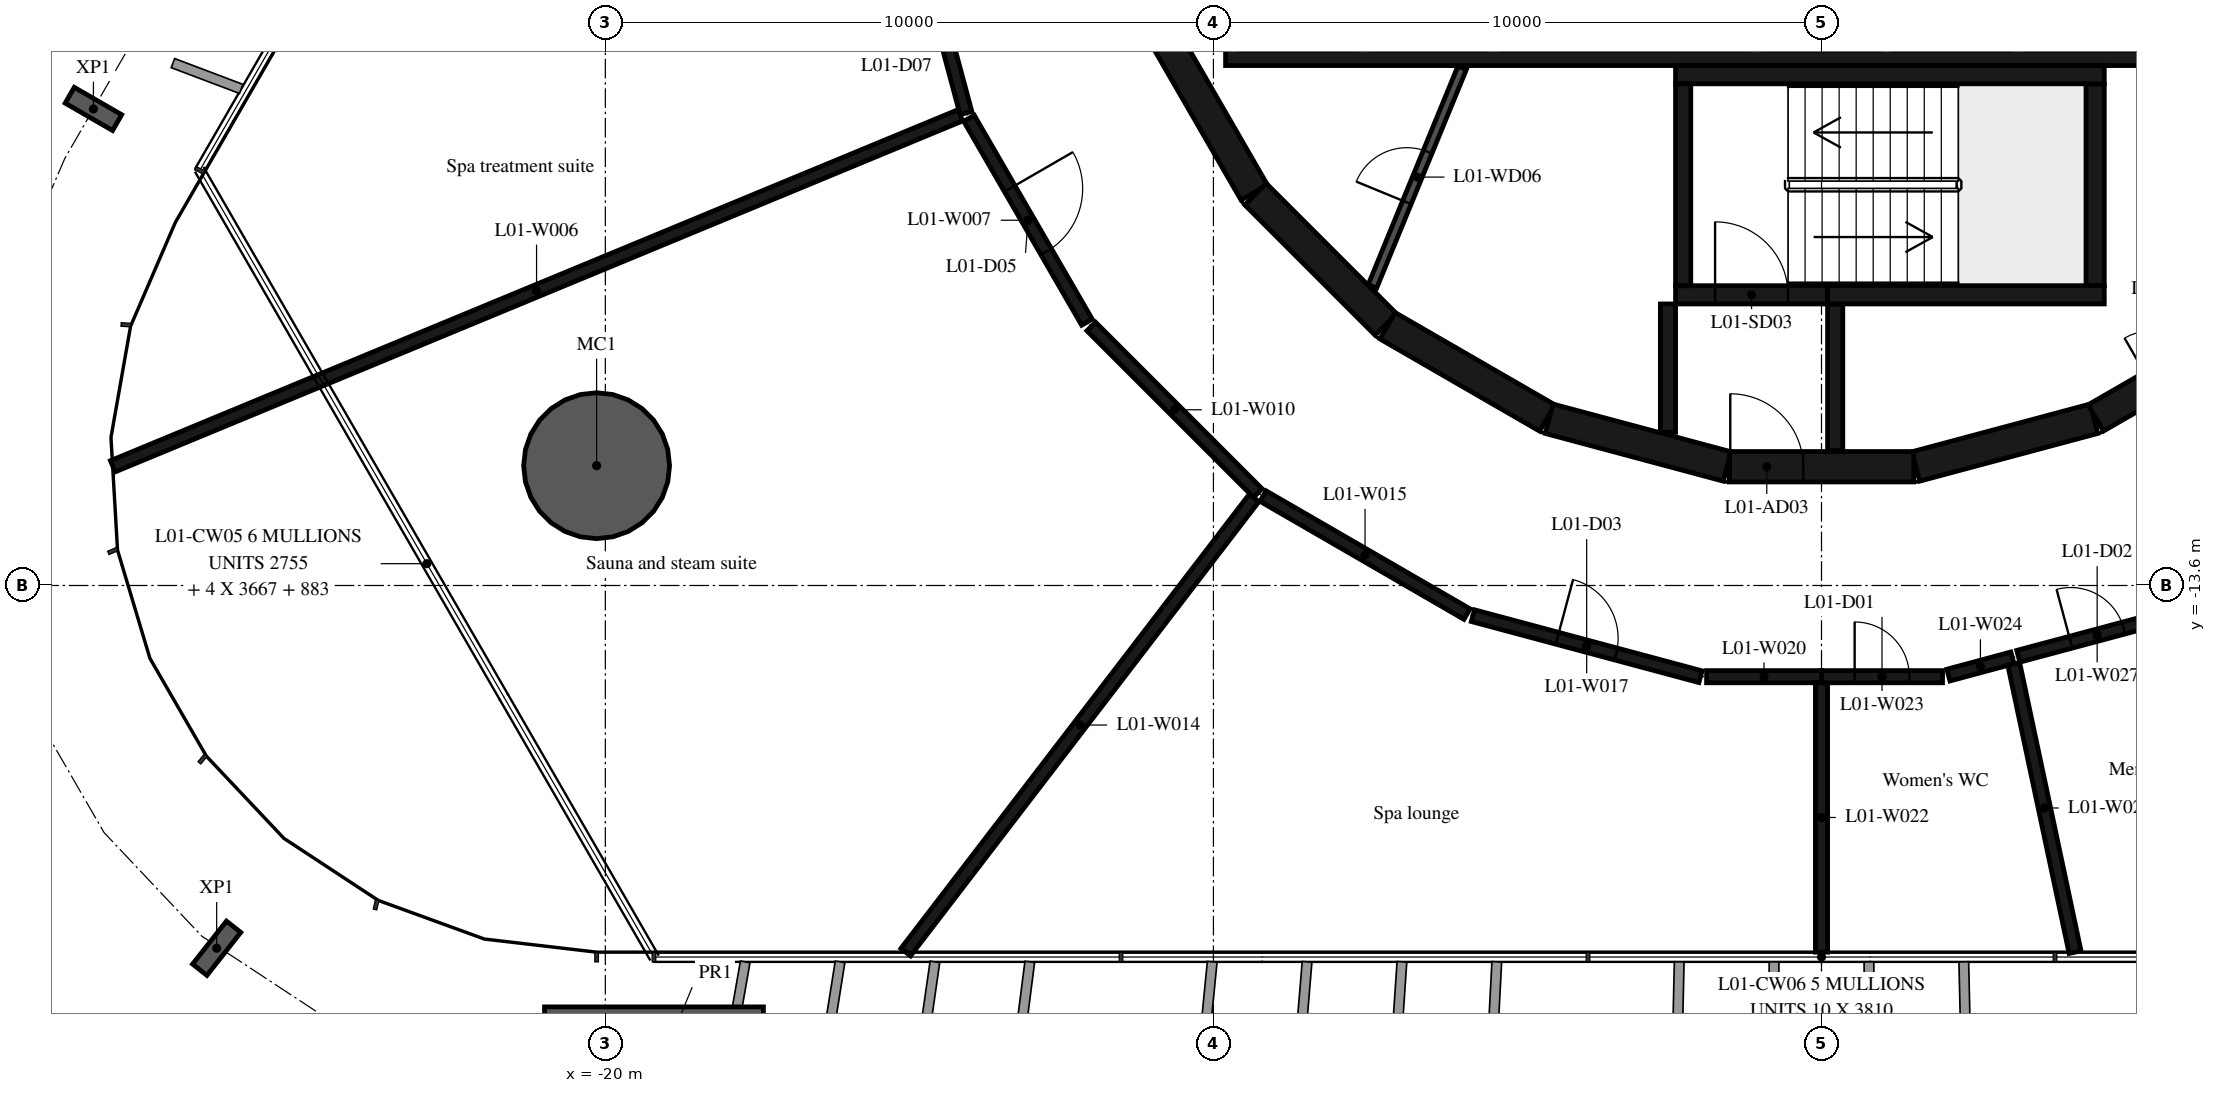
"""IFC4 building model, lengths in metres.
Left out: names, types, materials, properties, quantities, classifications, styles, units other than length and angle.
Written with IfcOpenShell. Run it as: python <this file> out.ifc"""

import sys

from ifc_helpers import new_model, si_unit, direction, frame, frame_2d, origin, origin_2d, place, context, subcontext, project, spatial, polyline, rectangle, hollow_circle, i_section, outline, extrude, element, fill, save


model = new_model("IFC4")
c1 = context("Model", 3, precision=1e-05, world=origin(), true_north=direction((0.0, 1.0)))
c2 = subcontext(c1, "Body", "Model", "MODEL_VIEW")
j1 = project(units=[si_unit("LENGTHUNIT", "METRE"), si_unit("PLANEANGLEUNIT", "RADIAN")], contexts=[c1])
p1 = place(None, origin())
s1 = spatial("IfcSite", under=j1, at=p1, CompositionType="ELEMENT")
p2 = place(p1, origin())
s2 = spatial("IfcBuilding", under=s1, at=p2, CompositionType="ELEMENT")
p3 = place(p2, frame((0.0, 0.0, 9.0)))
s3 = spatial("IfcBuildingStorey", under=s2, at=p3, CompositionType="ELEMENT", Elevation=9.0)
p4 = place(p3, frame((-20.144, -11.63, -0.38), z_axis=(0.0, 0.0, 1.0), x_axis=(1.0, 0.0, 0.0)))
e1 = element("IfcColumn", 1, at=p4, inside=s3, PredefinedType="COLUMN", context=c2, shape_type="SweptSolid", body=[
    extrude(hollow_circle(Radius=1.2, WallThickness=0.06, at=origin_2d()), origin(), (0.0, 0.0, 1.0), 4.8),
])
for number, where, z_axis, x_axis in (
    (2, (-28.419, -5.763, -0.38), (0.0, 0.0, 1.0), (0.5, 0.866, 0.0)),
    (3, (-26.392, -19.565, -0.38), (0.0, 0.0, 1.0), (-0.786, 0.619, 0.0)),
):
    element("IfcColumn", number, at=place(p3, frame(where, z_axis=z_axis, x_axis=x_axis)), inside=s3, PredefinedType="COLUMN", context=c2, shape_type="SweptSolid", body=[
        extrude(i_section(OverallWidth=0.3, OverallDepth=0.9, WebThickness=0.019, FlangeThickness=0.035, FilletRadius=0.03, at=origin_2d()), origin(), (0.0, 0.0, 1.0), 4.8),
    ])
p5 = place(p3, frame((-19.2, -21.73, -0.38), z_axis=(0.0, 0.0, 1.0), x_axis=(1.0, 0.0, 0.0)))
e4 = element("IfcColumn", 4, at=p5, inside=s3, PredefinedType="COLUMN", context=c2, shape_type="SweptSolid", body=[
    extrude(rectangle(XDim=3.6, YDim=2.4, at=origin_2d()), origin(), (0.0, 0.0, 1.0), 4.8),
])
p6 = place(p3, frame((1.55, -11.643, 0.0), z_axis=(0.0, 0.0, 1.0), x_axis=(0.965948410781, 0.258734743916, 0.0)))
e5 = element("IfcWall", 5, at=p6, inside=s3, PredefinedType="SHEAR", context=c2, shape_type="SweptSolid", body=[
    extrude(rectangle(XDim=3.033, YDim=0.5, at=frame_2d((1.516, 0.0))), origin(), (0.0, 0.0, 1.0), 4.42),
])
p7 = place(p3, frame((4.51, -10.845, 0.0), z_axis=(0.0, 0.0, 1.0), x_axis=(0.865975092491, 0.500087131594, 0.0)))
e6 = element("IfcWall", 6, at=p7, inside=s3, PredefinedType="SHEAR", context=c2, shape_type="SweptSolid", body=[
    extrude(rectangle(XDim=3.033, YDim=0.5, at=frame_2d((1.516, 0.0))), origin(), (0.0, 0.0, 1.0), 4.42),
])
p8 = place(p7, frame((1.066, 0.0, 0.0)))
e7 = element("IfcOpeningElement", 7, at=p8, cuts=e6, PredefinedType="OPENING", context=c2, shape_type="SweptSolid", body=[
    extrude(rectangle(XDim=0.9, YDim=2.1, at=frame_2d((0.45, 1.05))), frame((0.0, 0.26, 0.0), z_axis=(0.0, -1.0, 0.0), x_axis=(1.0, 0.0, 0.0)), (0.0, 0.0, 1.0), 0.52),
])
p9 = place(p3, frame((-10.845, -4.51, 0.0), z_axis=(0.0, 0.0, 1.0), x_axis=(0.500087131594, -0.865975092491, 0.0)))
e8 = element("IfcWall", 8, at=p9, inside=s3, PredefinedType="SHEAR", context=c2, shape_type="SweptSolid", body=[
    extrude(rectangle(XDim=3.033, YDim=0.5, at=frame_2d((1.516, 0.0))), origin(), (0.0, 0.0, 1.0), 4.42),
])
p10 = place(p3, frame((-9.308, -7.164, 0.0), z_axis=(0.0, 0.0, 1.0), x_axis=(0.707106781187, -0.707106781187, 0.0)))
e9 = element("IfcWall", 9, at=p10, inside=s3, PredefinedType="SHEAR", context=c2, shape_type="SweptSolid", body=[
    extrude(rectangle(XDim=3.032, YDim=0.5, at=frame_2d((1.516, 0.0))), origin(), (0.0, 0.0, 1.0), 4.42),
])
for number, where, z_axis, x_axis in (
    (10, (-7.137, -9.329, 0.0), (0.0, 0.0, 1.0), (0.866, -0.5, 0.0)),
    (11, (-4.479, -10.858, 0.0), (0.0, 0.0, 1.0), (0.966, -0.259, 0.0)),
):
    element("IfcWall", number, at=place(p3, frame(where, z_axis=z_axis, x_axis=x_axis)), inside=s3, PredefinedType="SHEAR", context=c2, shape_type="SweptSolid", body=[
        extrude(rectangle(XDim=3.033, YDim=0.5, at=frame_2d((1.516, 0.0))), origin(), (0.0, 0.0, 1.0), 4.42),
    ])
p11 = place(p3, frame((-1.516, -11.647, 0.0), z_axis=(0.0, 0.0, 1.0), x_axis=(1.0, 0.0, 0.0)))
e12 = element("IfcWall", 12, at=p11, inside=s3, PredefinedType="SHEAR", context=c2, shape_type="SweptSolid", body=[
    extrude(rectangle(XDim=3.033, YDim=0.5, at=frame_2d((1.516, 0.0))), origin(), (0.0, 0.0, 1.0), 4.42),
])
p12 = place(p11, frame((0.016, 0.0, 0.0)))
e13 = element("IfcOpeningElement", 13, at=p12, cuts=e12, PredefinedType="OPENING", context=c2, shape_type="SweptSolid", body=[
    extrude(rectangle(XDim=1.2, YDim=2.1, at=frame_2d((0.6, 1.05))), frame((0.0, 0.26, 0.0), z_axis=(0.0, -1.0, 0.0), x_axis=(1.0, 0.0, 0.0)), (0.0, 0.0, 1.0), 0.52),
])
p13 = place(p3, frame((-2.275, -8.67, 0.0), z_axis=(0.0, 0.0, 1.0), x_axis=(0.0, 1.0, 0.0)))
e14 = element("IfcWall", 14, at=p13, inside=s3, PredefinedType="SHEAR", context=c2, shape_type="SweptSolid", body=[
    extrude(rectangle(XDim=3.32, YDim=0.25, at=frame_2d((1.66, 0.0))), origin(), (0.0, 0.0, 1.0), 4.42),
])
p14 = place(p3, frame((-2.4, -5.2, 0.0), z_axis=(0.0, 0.0, 1.0), x_axis=(1.0, 0.0, 0.0)))
e15 = element("IfcWall", 15, at=p14, inside=s3, PredefinedType="SHEAR", context=c2, shape_type="SweptSolid", body=[
    extrude(rectangle(XDim=7.05, YDim=0.3, at=frame_2d((3.525, 0.0))), origin(), (0.0, 0.0, 1.0), 4.42),
])
p15 = place(p3, frame((4.5, -8.67, 0.0), z_axis=(0.0, 0.0, 1.0), x_axis=(0.0, 1.0, 0.0)))
e16 = element("IfcWall", 16, at=p15, inside=s3, PredefinedType="SHEAR", context=c2, shape_type="SweptSolid", body=[
    extrude(rectangle(XDim=3.32, YDim=0.3, at=frame_2d((1.66, 0.0))), origin(), (0.0, 0.0, 1.0), 4.42),
])
p16 = place(p3, frame((0.1, -8.82, 0.0), z_axis=(0.0, 0.0, 1.0), x_axis=(1.0, 0.0, 0.0)))
e17 = element("IfcWall", 17, at=p16, inside=s3, PredefinedType="SHEAR", context=c2, shape_type="SweptSolid", body=[
    extrude(rectangle(XDim=4.55, YDim=0.3, at=frame_2d((2.275, 0.0))), origin(), (0.0, 0.0, 1.0), 4.42),
])
p17 = place(p3, frame((-2.4, -8.82, 0.0), z_axis=(0.0, 0.0, 1.0), x_axis=(1.0, 0.0, 0.0)))
e18 = element("IfcWall", 18, at=p17, inside=s3, PredefinedType="SHEAR", context=c2, shape_type="SweptSolid", body=[
    extrude(rectangle(XDim=2.5, YDim=0.3, at=frame_2d((1.25, 0.0))), origin(), (0.0, 0.0, 1.0), 4.42),
])
p18 = place(p17, frame((0.65, 0.0, 0.0)))
e19 = element("IfcOpeningElement", 19, at=p18, cuts=e18, PredefinedType="OPENING", context=c2, shape_type="SweptSolid", body=[
    extrude(rectangle(XDim=1.2, YDim=2.1, at=frame_2d((0.6, 1.05))), frame((0.0, 0.16, 0.0), z_axis=(0.0, -1.0, 0.0), x_axis=(1.0, 0.0, 0.0)), (0.0, 0.0, 1.0), 0.32),
])
p19 = place(p3, frame((-2.525, -8.97, 0.0), z_axis=(0.0, 0.0, 1.0), x_axis=(0.0, -1.0, 0.0)))
e20 = element("IfcWall", 20, at=p19, inside=s3, PredefinedType="SHEAR", context=c2, shape_type="SweptSolid", body=[
    extrude(rectangle(XDim=2.11, YDim=0.25, at=frame_2d((1.055, 0.0))), origin(), (0.0, 0.0, 1.0), 4.42),
])
p20 = place(p3, frame((0.225, -8.97, 0.0), z_axis=(0.0, 0.0, 1.0), x_axis=(0.0, -1.0, 0.0)))
e21 = element("IfcWall", 21, at=p20, inside=s3, PredefinedType="SHEAR", context=c2, shape_type="SweptSolid", body=[
    extrude(rectangle(XDim=2.41, YDim=0.25, at=frame_2d((1.205, 0.0))), origin(), (0.0, 0.0, 1.0), 4.42),
])
p21 = place(p3, origin())
e22 = element("IfcWall", 22, at=p21, inside=s3, PredefinedType="SHEAR", context=c2, shape_type="SweptSolid", body=[
    extrude(outline(polyline([(9.8, -5.05), (9.8, -4.8), (9.8, -1.9), (9.55, -1.9), (9.55, -4.8), (7.65, -4.8), (7.65, -1.9), (7.4, -1.9), (7.4, -4.8), (5.5, -4.8), (5.5, -1.9), (5.25, -1.9), (5.25, -4.8), (3.35, -4.8), (3.35, -1.9), (3.1, -1.9), (3.1, -4.8), (1.2, -4.8), (1.2, -1.9), (0.95, -1.9), (0.95, -4.8), (-0.95, -4.8), (-0.95, -1.9), (-1.2, -1.9), (-1.2, -4.8), (-5.25, -4.8), (-5.25, -1.9), (-5.5, -1.9), (-5.5, -4.8), (-7.4, -4.8), (-7.4, -1.9), (-7.65, -1.9), (-7.65, -4.8), (-9.55, -4.8), (-9.55, -1.9), (-9.8, -1.9), (-9.8, -4.8), (-9.8, -5.05), (9.8, -5.05)])), origin(), (0.0, 0.0, 1.0), 4.42),
])
p22 = place(p3, frame((-7.385, -8.681, 0.0), z_axis=(0.0, 0.0, 1.0), x_axis=(0.379804590409, 0.925066739811, 0.0)))
e23 = element("IfcWall", 23, at=p22, inside=s3, PredefinedType="PARTITIONING", context=c2, shape_type="SweptSolid", body=[
    extrude(rectangle(XDim=3.885, YDim=0.15, at=frame_2d((1.942, 0.0))), origin(), (0.0, 0.0, 1.0), 4.42),
])
p23 = place(p22, frame((1.493, 0.0, 0.0)))
e24 = element("IfcOpeningElement", 24, at=p23, cuts=e23, PredefinedType="OPENING", context=c2, shape_type="SweptSolid", body=[
    extrude(rectangle(XDim=0.9, YDim=2.1, at=frame_2d((0.45, 1.05))), frame((0.0, 0.085, 0.0), z_axis=(0.0, -1.0, 0.0), x_axis=(1.0, 0.0, 0.0)), (0.0, 0.0, 1.0), 0.17),
])
p24 = place(p3, frame((-15.068, -2.111, 0.0), z_axis=(0.0, 0.0, 1.0), x_axis=(0.259059323171, -0.965861411942, 0.0)))
e25 = element("IfcWall", 25, at=p24, inside=s3, PredefinedType="PARTITIONING", context=c2, shape_type="SweptSolid", body=[
    extrude(rectangle(XDim=3.851, YDim=0.2, at=frame_2d((1.925, 0.0))), origin(), (0.0, 0.0, 1.0), 4.42),
])
p25 = place(p24, frame((1.325, 0.0, 0.0)))
e26 = element("IfcOpeningElement", 26, at=p25, cuts=e25, PredefinedType="OPENING", context=c2, shape_type="SweptSolid", body=[
    extrude(rectangle(XDim=1.2, YDim=2.1, at=frame_2d((0.6, 1.05))), frame((0.0, 0.11, 0.0), z_axis=(0.0, -1.0, 0.0), x_axis=(1.0, 0.0, 0.0)), (0.0, 0.0, 1.0), 0.22),
])
p26 = place(p3, frame((-14.162, -5.868, 0.0), z_axis=(0.0, 0.0, 1.0), x_axis=(-0.923914077449, -0.382600022859, 0.0)))
e27 = element("IfcWall", 27, at=p26, inside=s3, PredefinedType="PARTITIONING", context=c2, shape_type="SweptSolid", body=[
    extrude(rectangle(XDim=15.085, YDim=0.2, at=frame_2d((7.543, 0.0))), origin(), (0.0, 0.0, 1.0), 4.42),
])
p27 = place(p3, frame((-14.02, -5.917, 0.0), z_axis=(0.0, 0.0, 1.0), x_axis=(0.500733182901, -0.865601686425, 0.0)))
e28 = element("IfcWall", 28, at=p27, inside=s3, PredefinedType="PARTITIONING", context=c2, shape_type="SweptSolid", body=[
    extrude(rectangle(XDim=3.874, YDim=0.2, at=frame_2d((1.937, 0.0))), origin(), (0.0, 0.0, 1.0), 4.42),
])
p28 = place(p27, frame((1.337, 0.0, 0.0)))
e29 = element("IfcOpeningElement", 29, at=p28, cuts=e28, PredefinedType="OPENING", context=c2, shape_type="SweptSolid", body=[
    extrude(rectangle(XDim=1.2, YDim=2.1, at=frame_2d((0.6, 1.05))), frame((0.0, 0.11, 0.0), z_axis=(0.0, -1.0, 0.0), x_axis=(1.0, 0.0, 0.0)), (0.0, 0.0, 1.0), 0.22),
])
p29 = place(p3, frame((-12.009, -9.341, 0.0), z_axis=(0.0, 0.0, 1.0), x_axis=(0.707106781187, -0.707106781187, 0.0)))
e30 = element("IfcWall", 30, at=p29, inside=s3, PredefinedType="PARTITIONING", context=c2, shape_type="SweptSolid", body=[
    extrude(rectangle(XDim=3.874, YDim=0.2, at=frame_2d((1.937, 0.0))), origin(), (0.0, 0.0, 1.0), 4.42),
])
p30 = place(p3, frame((-9.331, -12.159, 0.0), z_axis=(0.0, 0.0, 1.0), x_axis=(-0.608558385637, -0.793509099677, 0.0)))
e31 = element("IfcWall", 31, at=p30, inside=s3, PredefinedType="PARTITIONING", context=c2, shape_type="SweptSolid", body=[
    extrude(rectangle(XDim=9.415, YDim=0.2, at=frame_2d((4.707, 0.0))), origin(), (0.0, 0.0, 1.0), 4.42),
])
p31 = place(p3, frame((-9.183, -12.13, 0.0), z_axis=(0.0, 0.0, 1.0), x_axis=(0.865585884642, -0.500760497952, 0.0)))
e32 = element("IfcWall", 32, at=p31, inside=s3, PredefinedType="PARTITIONING", context=c2, shape_type="SweptSolid", body=[
    extrude(rectangle(XDim=3.874, YDim=0.2, at=frame_2d((1.937, 0.0))), origin(), (0.0, 0.0, 1.0), 4.42),
])
p32 = place(p3, frame((-5.733, -14.096, 0.0), z_axis=(0.0, 0.0, 1.0), x_axis=(0.96585437197, -0.259085569159, 0.0)))
e33 = element("IfcWall", 33, at=p32, inside=s3, PredefinedType="PARTITIONING", context=c2, shape_type="SweptSolid", body=[
    extrude(rectangle(XDim=3.876, YDim=0.2, at=frame_2d((1.938, 0.0))), origin(), (0.0, 0.0, 1.0), 4.42),
])
p33 = place(p32, frame((1.438, 0.0, 0.0)))
e34 = element("IfcOpeningElement", 34, at=p33, cuts=e33, PredefinedType="OPENING", context=c2, shape_type="SweptSolid", body=[
    extrude(rectangle(XDim=1.0, YDim=2.1, at=frame_2d((0.5, 1.05))), frame((0.0, 0.11, 0.0), z_axis=(0.0, -1.0, 0.0), x_axis=(1.0, 0.0, 0.0)), (0.0, 0.0, 1.0), 0.22),
])
p34 = place(p3, frame((-1.89, -15.1, 0.0), z_axis=(0.0, 0.0, 1.0), x_axis=(1.0, 0.0, 0.0)))
e35 = element("IfcWall", 35, at=p34, inside=s3, PredefinedType="PARTITIONING", context=c2, shape_type="SweptSolid", body=[
    extrude(rectangle(XDim=1.89, YDim=0.2, at=frame_2d((0.945, 0.0))), origin(), (0.0, 0.0, 1.0), 4.42),
])
p35 = place(p3, frame((0.0, -15.2, 0.0), z_axis=(0.0, 0.0, 1.0), x_axis=(0.0, -1.0, 0.0)))
e36 = element("IfcWall", 36, at=p35, inside=s3, PredefinedType="PARTITIONING", context=c2, shape_type="SweptSolid", body=[
    extrude(rectangle(XDim=4.43, YDim=0.2, at=frame_2d((2.215, 0.0))), origin(), (0.0, 0.0, 1.0), 4.42),
])
p36 = place(p3, frame((0.0, -15.1, 0.0), z_axis=(0.0, 0.0, 1.0), x_axis=(1.0, 0.0, 0.0)))
e37 = element("IfcWall", 37, at=p36, inside=s3, PredefinedType="PARTITIONING", context=c2, shape_type="SweptSolid", body=[
    extrude(rectangle(XDim=1.99, YDim=0.2, at=frame_2d((0.995, 0.0))), origin(), (0.0, 0.0, 1.0), 4.42),
])
p37 = place(p36, frame((0.545, 0.0, 0.0)))
e38 = element("IfcOpeningElement", 38, at=p37, cuts=e37, PredefinedType="OPENING", context=c2, shape_type="SweptSolid", body=[
    extrude(rectangle(XDim=0.9, YDim=2.1, at=frame_2d((0.45, 1.05))), frame((0.0, 0.11, 0.0), z_axis=(0.0, -1.0, 0.0), x_axis=(1.0, 0.0, 0.0)), (0.0, 0.0, 1.0), 0.22),
])
p38 = place(p3, frame((2.087, -15.074, 0.0), z_axis=(0.0, 0.0, 1.0), x_axis=(0.965529267024, 0.260294514963, 0.0)))
e39 = element("IfcWall", 39, at=p38, inside=s3, PredefinedType="PARTITIONING", context=c2, shape_type="SweptSolid", body=[
    extrude(rectangle(XDim=1.091, YDim=0.2, at=frame_2d((0.545, 0.0))), origin(), (0.0, 0.0, 1.0), 4.42),
])
p39 = place(p3, frame((3.161, -14.888, 0.0), z_axis=(0.0, 0.0, 1.0), x_axis=(0.208118919353, -0.978103530005, 0.0)))
e40 = element("IfcWall", 40, at=p39, inside=s3, PredefinedType="PARTITIONING", context=c2, shape_type="SweptSolid", body=[
    extrude(rectangle(XDim=4.848, YDim=0.2, at=frame_2d((2.424, 0.0))), origin(), (0.0, 0.0, 1.0), 4.42),
])
p40 = place(p3, frame((3.237, -14.764, 0.0), z_axis=(0.0, 0.0, 1.0), x_axis=(0.966003629213, 0.25852850587, 0.0)))
e41 = element("IfcWall", 41, at=p40, inside=s3, PredefinedType="PARTITIONING", context=c2, shape_type="SweptSolid", body=[
    extrude(rectangle(XDim=2.685, YDim=0.2, at=frame_2d((1.342, 0.0))), origin(), (0.0, 0.0, 1.0), 4.42),
])
p41 = place(p40, frame((0.892, 0.0, 0.0)))
e42 = element("IfcOpeningElement", 42, at=p41, cuts=e41, PredefinedType="OPENING", context=c2, shape_type="SweptSolid", body=[
    extrude(rectangle(XDim=0.9, YDim=2.1, at=frame_2d((0.45, 1.05))), frame((0.0, 0.11, 0.0), z_axis=(0.0, -1.0, 0.0), x_axis=(1.0, 0.0, 0.0)), (0.0, 0.0, 1.0), 0.22),
])
p42 = place(p18, origin())
e43 = element("IfcDoor", 43, at=p42, inside=s3, OperationType="SINGLE_SWING_LEFT", PredefinedType="DOOR", context=c2, shape_type="SweptSolid", body=[
    extrude(rectangle(XDim=1.2, YDim=2.1, at=frame_2d((0.6, 1.05))), frame((0.0, 0.025, 0.0), z_axis=(0.0, -1.0, 0.0), x_axis=(1.0, 0.0, 0.0)), (0.0, 0.0, 1.0), 0.05),
])
fill(e19, e43)
p43 = place(p12, origin())
e44 = element("IfcDoor", 44, at=p43, inside=s3, OperationType="SINGLE_SWING_RIGHT", PredefinedType="DOOR", context=c2, shape_type="SweptSolid", body=[
    extrude(rectangle(XDim=1.2, YDim=2.1, at=frame_2d((0.6, 1.05))), frame((0.0, 0.025, 0.0), z_axis=(0.0, -1.0, 0.0), x_axis=(1.0, 0.0, 0.0)), (0.0, 0.0, 1.0), 0.05),
])
fill(e13, e44)
p44 = place(p23, origin())
e45 = element("IfcDoor", 45, at=p44, inside=s3, OperationType="SINGLE_SWING_LEFT", PredefinedType="DOOR", context=c2, shape_type="SweptSolid", body=[
    extrude(rectangle(XDim=0.9, YDim=2.1, at=frame_2d((0.45, 1.05))), frame((0.0, 0.025, 0.0), z_axis=(0.0, -1.0, 0.0), x_axis=(1.0, 0.0, 0.0)), (0.0, 0.0, 1.0), 0.05),
])
fill(e24, e45)
p45 = place(p37, origin())
e46 = element("IfcDoor", 46, at=p45, inside=s3, OperationType="SINGLE_SWING_LEFT", PredefinedType="DOOR", context=c2, shape_type="SweptSolid", body=[
    extrude(rectangle(XDim=0.9, YDim=2.1, at=frame_2d((0.45, 1.05))), frame((0.0, 0.025, 0.0), z_axis=(0.0, -1.0, 0.0), x_axis=(1.0, 0.0, 0.0)), (0.0, 0.0, 1.0), 0.05),
])
fill(e38, e46)
p46 = place(p41, origin())
e47 = element("IfcDoor", 47, at=p46, inside=s3, OperationType="SINGLE_SWING_LEFT", PredefinedType="DOOR", context=c2, shape_type="SweptSolid", body=[
    extrude(rectangle(XDim=0.9, YDim=2.1, at=frame_2d((0.45, 1.05))), frame((0.0, 0.025, 0.0), z_axis=(0.0, -1.0, 0.0), x_axis=(1.0, 0.0, 0.0)), (0.0, 0.0, 1.0), 0.05),
])
fill(e42, e47)
p47 = place(p33, origin())
e48 = element("IfcDoor", 48, at=p47, inside=s3, OperationType="SINGLE_SWING_LEFT", PredefinedType="DOOR", context=c2, shape_type="SweptSolid", body=[
    extrude(rectangle(XDim=1.0, YDim=2.1, at=frame_2d((0.5, 1.05))), frame((0.0, 0.025, 0.0), z_axis=(0.0, -1.0, 0.0), x_axis=(1.0, 0.0, 0.0)), (0.0, 0.0, 1.0), 0.05),
])
fill(e34, e48)
p48 = place(p28, origin())
e49 = element("IfcDoor", 49, at=p48, inside=s3, OperationType="SINGLE_SWING_LEFT", PredefinedType="DOOR", context=c2, shape_type="SweptSolid", body=[
    extrude(rectangle(XDim=1.2, YDim=2.1, at=frame_2d((0.6, 1.05))), frame((0.0, 0.025, 0.0), z_axis=(0.0, -1.0, 0.0), x_axis=(1.0, 0.0, 0.0)), (0.0, 0.0, 1.0), 0.05),
])
fill(e29, e49)
save(model, sys.argv[1])
